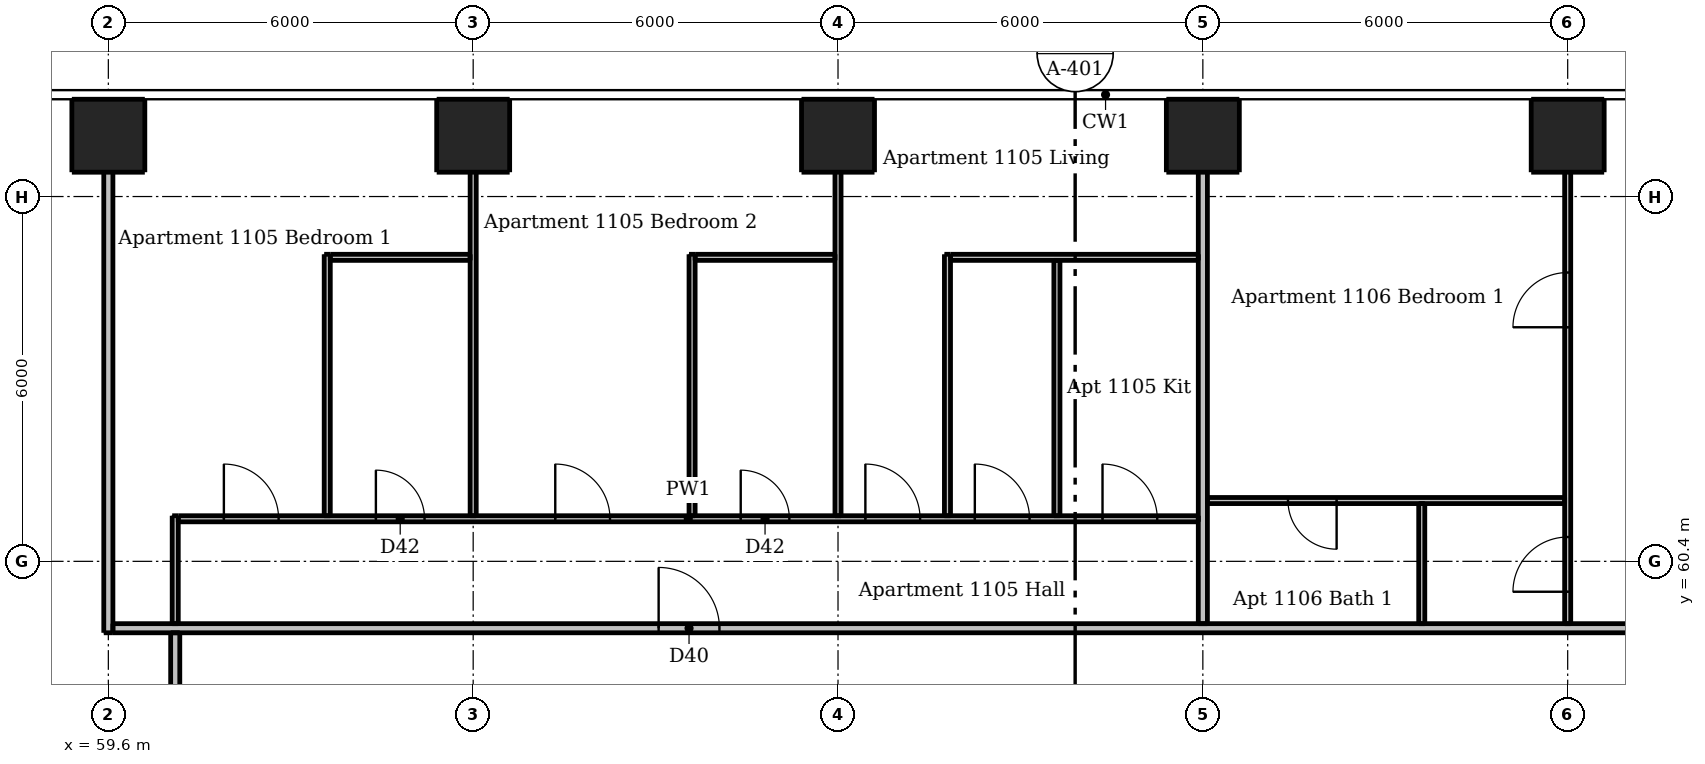
"""IFC4 building model, lengths in metres.
Left out: names, types, materials, properties, quantities, classifications, styles, units other than length and angle.
Written with IfcOpenShell. Run it as: python <this file> out.ifc"""

import sys

from ifc_helpers import new_model, si_unit, direction, frame, frame_2d, origin, origin_2d, place, context, subcontext, project, spatial, rectangle, extrude, element, fill, save


model = new_model("IFC4")
c1 = context("Model", 3, precision=1e-05, world=origin(), true_north=direction((0.0, 1.0)))
c2 = subcontext(c1, "Body", "Model", "MODEL_VIEW")
j1 = project(units=[si_unit("LENGTHUNIT", "METRE"), si_unit("PLANEANGLEUNIT", "RADIAN")], contexts=[c1])
p1 = place(None, origin())
s1 = spatial("IfcSite", under=j1, at=p1, CompositionType="ELEMENT")
p2 = place(p1, origin())
s2 = spatial("IfcBuilding", under=s1, at=p2, CompositionType="ELEMENT")
p3 = place(p2, frame((0.0, 0.0, 43.3)))
s3 = spatial("IfcBuildingStorey", under=s2, at=p3, CompositionType="ELEMENT", Elevation=43.3)
for number, where, z_axis, x_axis in (
    (1, (59.6, 67.4, 0.0), (0.0, 0.0, 1.0), (1.0, 0.0, 0.0)),
    (2, (65.6, 67.4, 0.0), (0.0, 0.0, 1.0), (1.0, 0.0, 0.0)),
    (3, (71.6, 67.4, 0.0), (0.0, 0.0, 1.0), (1.0, 0.0, 0.0)),
    (4, (77.6, 67.4, 0.0), (0.0, 0.0, 1.0), (1.0, 0.0, 0.0)),
    (5, (83.6, 67.4, 0.0), (0.0, 0.0, 1.0), (1.0, 0.0, 0.0)),
):
    element("IfcColumn", number, at=place(p3, frame(where, z_axis=z_axis, x_axis=x_axis)), inside=s3, PredefinedType="COLUMN", context=c2, shape_type="SweptSolid", body=[
        extrude(rectangle(XDim=1.2, YDim=1.2, at=origin_2d()), origin(), (0.0, 0.0, 1.0), 3.05),
    ])
p4 = place(p3, frame((60.7, 59.375, 0.0), z_axis=(0.0, 0.0, 1.0), x_axis=(0.0, 1.0, 0.0)))
e6 = element("IfcWall", 6, at=p4, inside=s3, PredefinedType="PARTITIONING", context=c2, shape_type="SweptSolid", body=[
    extrude(rectangle(XDim=1.775, YDim=0.1, at=frame_2d((0.887, 0.0))), origin(), (0.0, 0.0, 1.0), 3.05),
])
p5 = place(p3, frame((63.2, 61.15, 0.0), z_axis=(0.0, 0.0, 1.0), x_axis=(0.0, 1.0, 0.0)))
e7 = element("IfcWall", 7, at=p5, inside=s3, PredefinedType="PARTITIONING", context=c2, shape_type="SweptSolid", body=[
    extrude(rectangle(XDim=4.3, YDim=0.1, at=frame_2d((2.15, 0.0))), origin(), (0.0, 0.0, 1.0), 3.05),
])
p6 = place(p3, frame((65.6, 61.15, 0.0), z_axis=(0.0, 0.0, 1.0), x_axis=(0.0, 1.0, 0.0)))
e8 = element("IfcWall", 8, at=p6, inside=s3, PredefinedType="PARTITIONING", context=c2, shape_type="SweptSolid", body=[
    extrude(rectangle(XDim=6.85, YDim=0.1, at=frame_2d((3.425, 0.0))), origin(), (0.0, 0.0, 1.0), 2.516),
])
p7 = place(p3, frame((69.2, 61.15, 0.0), z_axis=(0.0, 0.0, 1.0), x_axis=(0.0, 1.0, 0.0)))
e9 = element("IfcWall", 9, at=p7, inside=s3, PredefinedType="PARTITIONING", context=c2, shape_type="SweptSolid", body=[
    extrude(rectangle(XDim=4.3, YDim=0.1, at=frame_2d((2.15, 0.0))), origin(), (0.0, 0.0, 1.0), 3.05),
])
p8 = place(p3, frame((71.6, 61.15, 0.0), z_axis=(0.0, 0.0, 1.0), x_axis=(0.0, 1.0, 0.0)))
e10 = element("IfcWall", 10, at=p8, inside=s3, PredefinedType="PARTITIONING", context=c2, shape_type="SweptSolid", body=[
    extrude(rectangle(XDim=6.85, YDim=0.1, at=frame_2d((3.425, 0.0))), origin(), (0.0, 0.0, 1.0), 2.516),
])
p9 = place(p3, frame((73.4, 61.15, 0.0), z_axis=(0.0, 0.0, 1.0), x_axis=(0.0, 1.0, 0.0)))
e11 = element("IfcWall", 11, at=p9, inside=s3, PredefinedType="PARTITIONING", context=c2, shape_type="SweptSolid", body=[
    extrude(rectangle(XDim=4.3, YDim=0.1, at=frame_2d((2.15, 0.0))), origin(), (0.0, 0.0, 1.0), 3.05),
])
p10 = place(p3, frame((75.2, 61.15, 0.0), z_axis=(0.0, 0.0, 1.0), x_axis=(0.0, 1.0, 0.0)))
e12 = element("IfcWall", 12, at=p10, inside=s3, PredefinedType="PARTITIONING", context=c2, shape_type="SweptSolid", body=[
    extrude(rectangle(XDim=4.2, YDim=0.1, at=frame_2d((2.1, 0.0))), origin(), (0.0, 0.0, 1.0), 3.05),
])
p11 = place(p3, frame((81.2, 59.375, 0.0), z_axis=(0.0, 0.0, 1.0), x_axis=(0.0, 1.0, 0.0)))
e13 = element("IfcWall", 13, at=p11, inside=s3, PredefinedType="PARTITIONING", context=c2, shape_type="SweptSolid", body=[
    extrude(rectangle(XDim=1.975, YDim=0.1, at=frame_2d((0.988, 0.0))), origin(), (0.0, 0.0, 1.0), 3.05),
])
p12 = place(p3, frame((83.6, 59.375, 0.0), z_axis=(0.0, 0.0, 1.0), x_axis=(0.0, 1.0, 0.0)))
e14 = element("IfcWall", 14, at=p12, inside=s3, PredefinedType="PARTITIONING", context=c2, shape_type="SweptSolid", body=[
    extrude(rectangle(XDim=8.625, YDim=0.1, at=frame_2d((4.312, 0.0))), origin(), (0.0, 0.0, 1.0), 2.516),
])
p13 = place(p12, frame((0.525, 0.0, 0.0)))
e15 = element("IfcOpeningElement", 15, at=p13, cuts=e14, PredefinedType="OPENING", context=c2, shape_type="SweptSolid", body=[
    extrude(rectangle(XDim=0.9, YDim=2.1, at=frame_2d((0.45, 1.05))), frame((0.0, 0.06, 0.0), z_axis=(0.0, -1.0, 0.0), x_axis=(1.0, 0.0, 0.0)), (0.0, 0.0, 1.0), 0.12),
])
p14 = place(p12, frame((4.875, 0.0, 0.0)))
e16 = element("IfcOpeningElement", 16, at=p14, cuts=e14, PredefinedType="OPENING", context=c2, shape_type="SweptSolid", body=[
    extrude(rectangle(XDim=0.9, YDim=2.1, at=frame_2d((0.45, 1.05))), frame((0.0, 0.06, 0.0), z_axis=(0.0, -1.0, 0.0), x_axis=(1.0, 0.0, 0.0)), (0.0, 0.0, 1.0), 0.12),
])
for number, where, z_axis, x_axis in (
    (17, (63.25, 65.4, 0.0), (0.0, 0.0, 1.0), (1.0, 0.0, 0.0)),
    (18, (69.25, 65.4, 0.0), (0.0, 0.0, 1.0), (1.0, 0.0, 0.0)),
):
    element("IfcWall", number, at=place(p3, frame(where, z_axis=z_axis, x_axis=x_axis)), inside=s3, PredefinedType="PARTITIONING", context=c2, shape_type="SweptSolid", body=[
        extrude(rectangle(XDim=2.3, YDim=0.1, at=frame_2d((1.15, 0.0))), origin(), (0.0, 0.0, 1.0), 3.05),
    ])
p15 = place(p3, frame((73.45, 65.4, 0.0), z_axis=(0.0, 0.0, 1.0), x_axis=(1.0, 0.0, 0.0)))
e19 = element("IfcWall", 19, at=p15, inside=s3, PredefinedType="PARTITIONING", context=c2, shape_type="SweptSolid", body=[
    extrude(rectangle(XDim=4.075, YDim=0.1, at=frame_2d((2.038, 0.0))), origin(), (0.0, 0.0, 1.0), 3.05),
])
p16 = place(p3, frame((83.55, 61.4, 0.0), z_axis=(0.0, 0.0, 1.0), x_axis=(-1.0, 0.0, 0.0)))
e20 = element("IfcWall", 20, at=p16, inside=s3, PredefinedType="PARTITIONING", context=c2, shape_type="SweptSolid", body=[
    extrude(rectangle(XDim=5.875, YDim=0.1, at=frame_2d((2.938, 0.0))), origin(), (0.0, 0.0, 1.0), 3.05),
])
p17 = place(p16, frame((3.75, 0.0, 0.0)))
e21 = element("IfcOpeningElement", 21, at=p17, cuts=e20, PredefinedType="OPENING", context=c2, shape_type="SweptSolid", body=[
    extrude(rectangle(XDim=0.8, YDim=2.1, at=frame_2d((0.4, 1.05))), frame((0.0, 0.06, 0.0), z_axis=(0.0, -1.0, 0.0), x_axis=(1.0, 0.0, 0.0)), (0.0, 0.0, 1.0), 0.12),
])
p18 = place(p3, frame((60.75, 61.1, 0.0), z_axis=(0.0, 0.0, 1.0), x_axis=(1.0, 0.0, 0.0)))
e22 = element("IfcWall", 22, at=p18, inside=s3, PredefinedType="PARTITIONING", context=c2, shape_type="SweptSolid", body=[
    extrude(rectangle(XDim=16.775, YDim=0.1, at=frame_2d((8.387, 0.0))), origin(), (0.0, 0.0, 1.0), 3.05),
])
p19 = place(p18, frame((11.3, 0.0, 0.0)))
e23 = element("IfcOpeningElement", 23, at=p19, cuts=e22, PredefinedType="OPENING", context=c2, shape_type="SweptSolid", body=[
    extrude(rectangle(XDim=0.9, YDim=2.1, at=frame_2d((0.45, 1.05))), frame((0.0, 0.06, 0.0), z_axis=(0.0, -1.0, 0.0), x_axis=(1.0, 0.0, 0.0)), (0.0, 0.0, 1.0), 0.12),
])
p20 = place(p18, frame((15.2, 0.0, 0.0)))
e24 = element("IfcOpeningElement", 24, at=p20, cuts=e22, PredefinedType="OPENING", context=c2, shape_type="SweptSolid", body=[
    extrude(rectangle(XDim=0.9, YDim=2.1, at=frame_2d((0.45, 1.05))), frame((0.0, 0.06, 0.0), z_axis=(0.0, -1.0, 0.0), x_axis=(1.0, 0.0, 0.0)), (0.0, 0.0, 1.0), 0.12),
])
p21 = place(p18, frame((13.1, 0.0, 0.0)))
e25 = element("IfcOpeningElement", 25, at=p21, cuts=e22, PredefinedType="OPENING", context=c2, shape_type="SweptSolid", body=[
    extrude(rectangle(XDim=0.9, YDim=2.1, at=frame_2d((0.45, 1.05))), frame((0.0, 0.06, 0.0), z_axis=(0.0, -1.0, 0.0), x_axis=(1.0, 0.0, 0.0)), (0.0, 0.0, 1.0), 0.12),
])
p22 = place(p18, frame((0.75, 0.0, 0.0)))
e26 = element("IfcOpeningElement", 26, at=p22, cuts=e22, PredefinedType="OPENING", context=c2, shape_type="SweptSolid", body=[
    extrude(rectangle(XDim=0.9, YDim=2.1, at=frame_2d((0.45, 1.05))), frame((0.0, 0.06, 0.0), z_axis=(0.0, -1.0, 0.0), x_axis=(1.0, 0.0, 0.0)), (0.0, 0.0, 1.0), 0.12),
])
p23 = place(p18, frame((6.2, 0.0, 0.0)))
e27 = element("IfcOpeningElement", 27, at=p23, cuts=e22, PredefinedType="OPENING", context=c2, shape_type="SweptSolid", body=[
    extrude(rectangle(XDim=0.9, YDim=2.1, at=frame_2d((0.45, 1.05))), frame((0.0, 0.06, 0.0), z_axis=(0.0, -1.0, 0.0), x_axis=(1.0, 0.0, 0.0)), (0.0, 0.0, 1.0), 0.12),
])
p24 = place(p18, frame((3.25, 0.0, 0.0)))
e28 = element("IfcOpeningElement", 28, at=p24, cuts=e22, PredefinedType="OPENING", context=c2, shape_type="SweptSolid", body=[
    extrude(rectangle(XDim=0.8, YDim=2.1, at=frame_2d((0.4, 1.05))), frame((0.0, 0.06, 0.0), z_axis=(0.0, -1.0, 0.0), x_axis=(1.0, 0.0, 0.0)), (0.0, 0.0, 1.0), 0.12),
])
p25 = place(p18, frame((9.25, 0.0, 0.0)))
e29 = element("IfcOpeningElement", 29, at=p25, cuts=e22, PredefinedType="OPENING", context=c2, shape_type="SweptSolid", body=[
    extrude(rectangle(XDim=0.8, YDim=2.1, at=frame_2d((0.4, 1.05))), frame((0.0, 0.06, 0.0), z_axis=(0.0, -1.0, 0.0), x_axis=(1.0, 0.0, 0.0)), (0.0, 0.0, 1.0), 0.12),
])
p26 = place(p3, frame((59.6, 59.225, 0.0), z_axis=(0.0, 0.0, 1.0), x_axis=(0.0, 1.0, 0.0)))
e30 = element("IfcWall", 30, at=p26, inside=s3, PredefinedType="PARTITIONING", context=c2, shape_type="SweptSolid", body=[
    extrude(rectangle(XDim=8.775, YDim=0.15, at=frame_2d((4.387, 0.0))), origin(), (0.0, 0.0, 1.0), 2.51),
])
p27 = place(p3, frame((60.7, 30.325, 0.0), z_axis=(0.0, 0.0, 1.0), x_axis=(0.0, 1.0, 0.0)))
e31 = element("IfcWall", 31, at=p27, inside=s3, PredefinedType="PARTITIONING", context=c2, shape_type="SweptSolid", body=[
    extrude(rectangle(XDim=28.9, YDim=0.15, at=frame_2d((14.45, 0.0))), origin(), (0.0, 0.0, 1.0), 3.05),
])
p28 = place(p27, frame((7.375, 0.0, 0.0)))
e32 = element("IfcOpeningElement", 32, at=p28, cuts=e31, PredefinedType="OPENING", context=c2, shape_type="SweptSolid", body=[
    extrude(rectangle(XDim=1.0, YDim=2.1, at=frame_2d((0.5, 1.05))), frame((0.0, 0.085, 0.0), z_axis=(0.0, -1.0, 0.0), x_axis=(1.0, 0.0, 0.0)), (0.0, 0.0, 1.0), 0.17),
])
p29 = place(p27, frame((26.025, 0.0, 0.0)))
e33 = element("IfcOpeningElement", 33, at=p29, cuts=e31, PredefinedType="OPENING", context=c2, shape_type="SweptSolid", body=[
    extrude(rectangle(XDim=1.0, YDim=2.1, at=frame_2d((0.5, 1.05))), frame((0.0, 0.085, 0.0), z_axis=(0.0, -1.0, 0.0), x_axis=(1.0, 0.0, 0.0)), (0.0, 0.0, 1.0), 0.17),
])
p30 = place(p3, frame((77.6, 59.375, 0.0), z_axis=(0.0, 0.0, 1.0), x_axis=(0.0, 1.0, 0.0)))
e34 = element("IfcWall", 34, at=p30, inside=s3, PredefinedType="PARTITIONING", context=c2, shape_type="SweptSolid", body=[
    extrude(rectangle(XDim=8.625, YDim=0.15, at=frame_2d((4.312, 0.0))), origin(), (0.0, 0.0, 1.0), 2.516),
])
p31 = place(p3, frame((59.675, 59.3, 0.0), z_axis=(0.0, 0.0, 1.0), x_axis=(1.0, 0.0, 0.0)))
e35 = element("IfcWall", 35, at=p31, inside=s3, PredefinedType="PARTITIONING", context=c2, shape_type="SweptSolid", body=[
    extrude(rectangle(XDim=28.55, YDim=0.15, at=frame_2d((14.275, 0.0))), origin(), (0.0, 0.0, 1.0), 3.05),
])
p32 = place(p31, frame((8.975, 0.0, 0.0)))
e36 = element("IfcOpeningElement", 36, at=p32, cuts=e35, PredefinedType="OPENING", context=c2, shape_type="SweptSolid", body=[
    extrude(rectangle(XDim=1.0, YDim=2.1, at=frame_2d((0.5, 1.05))), frame((0.0, 0.085, 0.0), z_axis=(0.0, -1.0, 0.0), x_axis=(1.0, 0.0, 0.0)), (0.0, 0.0, 1.0), 0.17),
])
p33 = place(p31, frame((25.775, 0.0, 0.0)))
e37 = element("IfcOpeningElement", 37, at=p33, cuts=e35, PredefinedType="OPENING", context=c2, shape_type="SweptSolid", body=[
    extrude(rectangle(XDim=1.0, YDim=2.1, at=frame_2d((0.5, 1.05))), frame((0.0, 0.085, 0.0), z_axis=(0.0, -1.0, 0.0), x_axis=(1.0, 0.0, 0.0)), (0.0, 0.0, 1.0), 0.17),
])
p34 = place(p32, origin())
e38 = element("IfcDoor", 38, at=p34, inside=s3, OperationType="SINGLE_SWING_LEFT", PredefinedType="DOOR", context=c2, shape_type="SweptSolid", body=[
    extrude(rectangle(XDim=1.0, YDim=2.1, at=frame_2d((0.5, 1.05))), frame((0.0, 0.025, 0.0), z_axis=(0.0, -1.0, 0.0), x_axis=(1.0, 0.0, 0.0)), (0.0, 0.0, 1.0), 0.05),
])
fill(e36, e38)
p35 = place(p19, origin())
e39 = element("IfcDoor", 39, at=p35, inside=s3, OperationType="SINGLE_SWING_LEFT", PredefinedType="DOOR", context=c2, shape_type="SweptSolid", body=[
    extrude(rectangle(XDim=0.9, YDim=2.1, at=frame_2d((0.45, 1.05))), frame((0.0, 0.025, 0.0), z_axis=(0.0, -1.0, 0.0), x_axis=(1.0, 0.0, 0.0)), (0.0, 0.0, 1.0), 0.05),
])
fill(e23, e39)
p36 = place(p20, origin())
e40 = element("IfcDoor", 40, at=p36, inside=s3, OperationType="SINGLE_SWING_LEFT", PredefinedType="DOOR", context=c2, shape_type="SweptSolid", body=[
    extrude(rectangle(XDim=0.9, YDim=2.1, at=frame_2d((0.45, 1.05))), frame((0.0, 0.025, 0.0), z_axis=(0.0, -1.0, 0.0), x_axis=(1.0, 0.0, 0.0)), (0.0, 0.0, 1.0), 0.05),
])
fill(e24, e40)
p37 = place(p21, origin())
e41 = element("IfcDoor", 41, at=p37, inside=s3, OperationType="SINGLE_SWING_LEFT", PredefinedType="DOOR", context=c2, shape_type="SweptSolid", body=[
    extrude(rectangle(XDim=0.9, YDim=2.1, at=frame_2d((0.45, 1.05))), frame((0.0, 0.025, 0.0), z_axis=(0.0, -1.0, 0.0), x_axis=(1.0, 0.0, 0.0)), (0.0, 0.0, 1.0), 0.05),
])
fill(e25, e41)
p38 = place(p22, origin())
e42 = element("IfcDoor", 42, at=p38, inside=s3, OperationType="SINGLE_SWING_LEFT", PredefinedType="DOOR", context=c2, shape_type="SweptSolid", body=[
    extrude(rectangle(XDim=0.9, YDim=2.1, at=frame_2d((0.45, 1.05))), frame((0.0, 0.025, 0.0), z_axis=(0.0, -1.0, 0.0), x_axis=(1.0, 0.0, 0.0)), (0.0, 0.0, 1.0), 0.05),
])
fill(e26, e42)
p39 = place(p23, origin())
e43 = element("IfcDoor", 43, at=p39, inside=s3, OperationType="SINGLE_SWING_LEFT", PredefinedType="DOOR", context=c2, shape_type="SweptSolid", body=[
    extrude(rectangle(XDim=0.9, YDim=2.1, at=frame_2d((0.45, 1.05))), frame((0.0, 0.025, 0.0), z_axis=(0.0, -1.0, 0.0), x_axis=(1.0, 0.0, 0.0)), (0.0, 0.0, 1.0), 0.05),
])
fill(e27, e43)
p40 = place(p24, origin())
e44 = element("IfcDoor", 44, at=p40, inside=s3, OperationType="SINGLE_SWING_LEFT", PredefinedType="DOOR", context=c2, shape_type="SweptSolid", body=[
    extrude(rectangle(XDim=0.8, YDim=2.1, at=frame_2d((0.4, 1.05))), frame((0.0, 0.025, 0.0), z_axis=(0.0, -1.0, 0.0), x_axis=(1.0, 0.0, 0.0)), (0.0, 0.0, 1.0), 0.05),
])
fill(e28, e44)
p41 = place(p25, origin())
e45 = element("IfcDoor", 45, at=p41, inside=s3, OperationType="SINGLE_SWING_LEFT", PredefinedType="DOOR", context=c2, shape_type="SweptSolid", body=[
    extrude(rectangle(XDim=0.8, YDim=2.1, at=frame_2d((0.4, 1.05))), frame((0.0, 0.025, 0.0), z_axis=(0.0, -1.0, 0.0), x_axis=(1.0, 0.0, 0.0)), (0.0, 0.0, 1.0), 0.05),
])
fill(e29, e45)
p42 = place(p13, origin())
e46 = element("IfcDoor", 46, at=p42, inside=s3, OperationType="SINGLE_SWING_LEFT", PredefinedType="DOOR", context=c2, shape_type="SweptSolid", body=[
    extrude(rectangle(XDim=0.9, YDim=2.1, at=frame_2d((0.45, 1.05))), frame((0.0, 0.025, 0.0), z_axis=(0.0, -1.0, 0.0), x_axis=(1.0, 0.0, 0.0)), (0.0, 0.0, 1.0), 0.05),
])
fill(e15, e46)
p43 = place(p14, origin())
e47 = element("IfcDoor", 47, at=p43, inside=s3, OperationType="SINGLE_SWING_LEFT", PredefinedType="DOOR", context=c2, shape_type="SweptSolid", body=[
    extrude(rectangle(XDim=0.9, YDim=2.1, at=frame_2d((0.45, 1.05))), frame((0.0, 0.025, 0.0), z_axis=(0.0, -1.0, 0.0), x_axis=(1.0, 0.0, 0.0)), (0.0, 0.0, 1.0), 0.05),
])
fill(e16, e47)
p44 = place(p17, origin())
e48 = element("IfcDoor", 48, at=p44, inside=s3, OperationType="SINGLE_SWING_LEFT", PredefinedType="DOOR", context=c2, shape_type="SweptSolid", body=[
    extrude(rectangle(XDim=0.8, YDim=2.1, at=frame_2d((0.4, 1.05))), frame((0.0, 0.025, 0.0), z_axis=(0.0, -1.0, 0.0), x_axis=(1.0, 0.0, 0.0)), (0.0, 0.0, 1.0), 0.05),
])
fill(e21, e48)
save(model, sys.argv[1])
